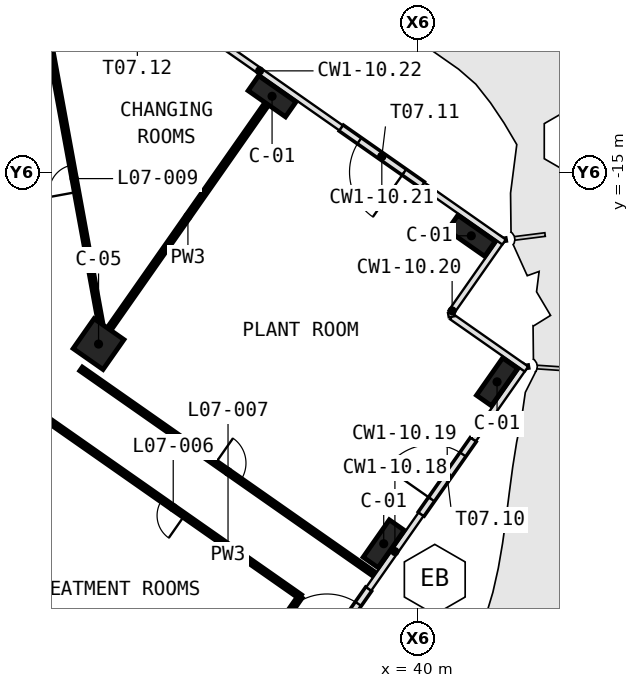
"""IFC4 building model, lengths in metres.
Left out: names, types, materials, properties, quantities, classifications, styles, units other than length and angle.
Written with IfcOpenShell. Run it as: python <this file> out.ifc"""

import sys

from ifc_helpers import new_model, si_unit, direction, frame, frame_2d, origin, origin_2d, place, context, subcontext, project, spatial, rectangle, extrude, element, fill, save


model = new_model("IFC4")
c1 = context("Model", 3, precision=1e-05, world=origin(), true_north=direction((0.0, 1.0)))
c2 = subcontext(c1, "Body", "Model", "MODEL_VIEW")
j1 = project(units=[si_unit("LENGTHUNIT", "METRE"), si_unit("PLANEANGLEUNIT", "RADIAN")], contexts=[c1])
p1 = place(None, origin())
s1 = spatial("IfcSite", under=j1, at=p1, CompositionType="ELEMENT")
p2 = place(p1, origin())
s2 = spatial("IfcBuilding", under=s1, at=p2, CompositionType="ELEMENT")
p3 = place(p2, frame((0.0, 0.0, 48.5)))
s3 = spatial("IfcBuildingStorey", under=s2, at=p3, CompositionType="ELEMENT", Elevation=48.5)
for number, where, z_axis, x_axis in (
    (1, (35.197, -12.498, 0.0), (0.0, 0.0, 1.0), (0.819, -0.574, 0.0)),
    (2, (41.75, -17.087, 0.0), (0.0, 0.0, 1.0), (0.819, -0.574, 0.0)),
    (3, (38.869, -27.216, 0.0), (0.0, 0.0, 1.0), (0.574, 0.819, 0.0)),
    (4, (42.597, -21.892, 0.0), (0.0, 0.0, 1.0), (0.574, 0.819, 0.0)),
):
    element("IfcColumn", number, at=place(p3, frame(where, z_axis=z_axis, x_axis=x_axis)), inside=s3, PredefinedType="COLUMN", context=c2, shape_type="SweptSolid", body=[
        extrude(rectangle(XDim=1.5, YDim=0.6, at=origin_2d()), origin(), (0.0, 0.0, 1.0), 6.0),
    ])
p4 = place(p3, frame((29.49, -20.649, 0.0), z_axis=(0.0, 0.0, 1.0), x_axis=(0.819152044289, -0.573576436351, 0.0)))
e5 = element("IfcColumn", 5, at=p4, inside=s3, PredefinedType="COLUMN", context=c2, shape_type="SweptSolid", body=[
    extrude(rectangle(XDim=1.2, YDim=1.2, at=origin_2d()), origin(), (0.0, 0.0, 1.0), 6.0),
])
p5 = place(p3, frame((36.674, -31.136, 0.0), z_axis=(0.0, 0.0, 1.0), x_axis=(0.57354593704, 0.81917339929, 0.0)))
e6 = element("IfcWall", 6, at=p5, inside=s3, PredefinedType="SOLIDWALL", context=c2, shape_type="SweptSolid", body=[
    extrude(rectangle(XDim=2.94, YDim=0.2, at=frame_2d((1.47, 0.0))), origin(), (0.0, 0.0, 1.0), 5.72),
])
p6 = place(p5, frame((0.57, 0.0, 0.0)))
e7 = element("IfcOpeningElement", 7, at=p6, cuts=e6, PredefinedType="OPENING", context=c2, shape_type="SweptSolid", body=[
    extrude(rectangle(XDim=1.8, YDim=2.4, at=frame_2d((0.9, 1.2))), frame((0.0, 0.11, 0.0), z_axis=(0.0, -1.0, 0.0), x_axis=(1.0, 0.0, 0.0)), (0.0, 0.0, 1.0), 0.22),
])
p7 = place(p3, frame((40.115, -26.221, 0.0), z_axis=(0.0, 0.0, 1.0), x_axis=(0.573584953252, 0.819146080625, 0.0)))
e8 = element("IfcWall", 8, at=p7, inside=s3, PredefinedType="SOLIDWALL", context=c2, shape_type="SweptSolid", body=[
    extrude(rectangle(XDim=2.94, YDim=0.2, at=frame_2d((1.47, 0.0))), origin(), (0.0, 0.0, 1.0), 5.72),
])
p8 = place(p7, frame((0.57, 0.0, 0.0)))
e9 = element("IfcOpeningElement", 9, at=p8, cuts=e8, PredefinedType="OPENING", context=c2, shape_type="SweptSolid", body=[
    extrude(rectangle(XDim=1.8, YDim=2.4, at=frame_2d((0.9, 1.2))), frame((0.0, 0.11, 0.0), z_axis=(0.0, -1.0, 0.0), x_axis=(1.0, 0.0, 0.0)), (0.0, 0.0, 1.0), 0.22),
])
p9 = place(p3, frame((40.122, -15.398, 0.0), z_axis=(0.0, 0.0, 1.0), x_axis=(-0.819156924044, 0.573569467276, 0.0)))
e10 = element("IfcWall", 10, at=p9, inside=s3, PredefinedType="SOLIDWALL", context=c2, shape_type="SweptSolid", body=[
    extrude(rectangle(XDim=3.212, YDim=0.2, at=frame_2d((1.606, 0.0))), origin(), (0.0, 0.0, 1.0), 5.72),
])
p10 = place(p9, frame((0.706, 0.0, 0.0)))
e11 = element("IfcOpeningElement", 11, at=p10, cuts=e10, PredefinedType="OPENING", context=c2, shape_type="SweptSolid", body=[
    extrude(rectangle(XDim=1.8, YDim=2.4, at=frame_2d((0.9, 1.2))), frame((0.0, 0.11, 0.0), z_axis=(0.0, -1.0, 0.0), x_axis=(1.0, 0.0, 0.0)), (0.0, 0.0, 1.0), 0.22),
])
p11 = place(p3, frame((28.914, -21.467, 0.0), z_axis=(0.0, 0.0, 1.0), x_axis=(0.81915027628, -0.573578961322, 0.0)))
e12 = element("IfcWall", 12, at=p11, inside=s3, PredefinedType="PARTITIONING", context=c2, shape_type="SweptSolid", body=[
    extrude(rectangle(XDim=11.802, YDim=0.15, at=frame_2d((5.901, 0.0))), origin(), (0.0, 0.0, 1.0), 4.9),
])
p12 = place(p11, frame((5.401, 0.0, 0.0)))
e13 = element("IfcOpeningElement", 13, at=p12, cuts=e12, PredefinedType="OPENING", context=c2, shape_type="SweptSolid", body=[
    extrude(rectangle(XDim=1.0, YDim=2.1, at=frame_2d((0.5, 1.05))), frame((0.0, 0.085, 0.0), z_axis=(0.0, -1.0, 0.0), x_axis=(1.0, 0.0, 0.0)), (0.0, 0.0, 1.0), 0.17),
])
p13 = place(p3, frame((35.264, -30.185, 0.0), z_axis=(0.0, 0.0, 1.0), x_axis=(0.573527897688, 0.819186029284, 0.0)))
e14 = element("IfcWall", 14, at=p13, inside=s3, PredefinedType="PARTITIONING", context=c2, shape_type="SweptSolid", body=[
    extrude(rectangle(XDim=1.5, YDim=0.15, at=frame_2d((0.75, 0.0))), origin(), (0.0, 0.0, 1.0), 5.72),
])
p14 = place(p3, frame((36.124, -28.957, 0.0), z_axis=(0.0, 0.0, 1.0), x_axis=(-0.819141970204, 0.573590823366, 0.0)))
e15 = element("IfcWall", 15, at=p14, inside=s3, PredefinedType="PARTITIONING", context=c2, shape_type="SweptSolid", body=[
    extrude(rectangle(XDim=10.202, YDim=0.15, at=frame_2d((5.101, 0.0))), origin(), (0.0, 0.0, 1.0), 5.0),
])
p15 = place(p14, frame((4.651, 0.0, 0.0)))
e16 = element("IfcOpeningElement", 16, at=p15, cuts=e15, PredefinedType="OPENING", context=c2, shape_type="SweptSolid", body=[
    extrude(rectangle(XDim=0.9, YDim=2.1, at=frame_2d((0.45, 1.05))), frame((0.0, 0.085, 0.0), z_axis=(0.0, -1.0, 0.0), x_axis=(1.0, 0.0, 0.0)), (0.0, 0.0, 1.0), 0.17),
])
p16 = place(p3, frame((35.013, -12.76, 0.0), z_axis=(0.0, 0.0, 1.0), x_axis=(-0.573558725113, -0.819164445546, 0.0)))
e17 = element("IfcWall", 17, at=p16, inside=s3, PredefinedType="PARTITIONING", context=c2, shape_type="SweptSolid", body=[
    extrude(rectangle(XDim=9.01, YDim=0.15, at=frame_2d((4.505, 0.0))), origin(), (0.0, 0.0, 1.0), 5.0),
])
p17 = place(p3, frame((29.551, -19.935, 0.0), z_axis=(0.0, 0.0, 1.0), x_axis=(-0.179754609775, 0.983711482227, 0.0)))
e18 = element("IfcWall", 18, at=p17, inside=s3, PredefinedType="PARTITIONING", context=c2, shape_type="SweptSolid", body=[
    extrude(rectangle(XDim=9.615, YDim=0.15, at=frame_2d((4.807, 0.0))), origin(), (0.0, 0.0, 1.0), 5.72),
])
p18 = place(p17, frame((4.357, 0.0, 0.0)))
e19 = element("IfcOpeningElement", 19, at=p18, cuts=e18, PredefinedType="OPENING", context=c2, shape_type="SweptSolid", body=[
    extrude(rectangle(XDim=0.9, YDim=2.1, at=frame_2d((0.45, 1.05))), frame((0.0, 0.085, 0.0), z_axis=(0.0, -1.0, 0.0), x_axis=(1.0, 0.0, 0.0)), (0.0, 0.0, 1.0), 0.17),
])
p19 = place(p6, origin())
e20 = element("IfcDoor", 20, at=p19, inside=s3, OperationType="DOUBLE_DOOR_DOUBLE_SWING", PredefinedType="DOOR", context=c2, shape_type="SweptSolid", body=[
    extrude(rectangle(XDim=1.8, YDim=2.4, at=frame_2d((0.9, 1.2))), frame((0.0, 0.025, 0.0), z_axis=(0.0, -1.0, 0.0), x_axis=(1.0, 0.0, 0.0)), (0.0, 0.0, 1.0), 0.05),
])
fill(e7, e20)
p20 = place(p8, origin())
e21 = element("IfcDoor", 21, at=p20, inside=s3, OperationType="DOUBLE_DOOR_DOUBLE_SWING", PredefinedType="DOOR", context=c2, shape_type="SweptSolid", body=[
    extrude(rectangle(XDim=1.8, YDim=2.4, at=frame_2d((0.9, 1.2))), frame((0.0, 0.025, 0.0), z_axis=(0.0, -1.0, 0.0), x_axis=(1.0, 0.0, 0.0)), (0.0, 0.0, 1.0), 0.05),
])
fill(e9, e21)
p21 = place(p10, origin())
e22 = element("IfcDoor", 22, at=p21, inside=s3, OperationType="DOUBLE_DOOR_DOUBLE_SWING", PredefinedType="DOOR", context=c2, shape_type="SweptSolid", body=[
    extrude(rectangle(XDim=1.8, YDim=2.4, at=frame_2d((0.9, 1.2))), frame((0.0, 0.025, 0.0), z_axis=(0.0, -1.0, 0.0), x_axis=(1.0, 0.0, 0.0)), (0.0, 0.0, 1.0), 0.05),
])
fill(e11, e22)
p22 = place(p15, origin())
e23 = element("IfcDoor", 23, at=p22, inside=s3, OperationType="SINGLE_SWING_LEFT", PredefinedType="DOOR", context=c2, shape_type="SweptSolid", body=[
    extrude(rectangle(XDim=0.9, YDim=2.1, at=frame_2d((0.45, 1.05))), frame((0.0, 0.025, 0.0), z_axis=(0.0, -1.0, 0.0), x_axis=(1.0, 0.0, 0.0)), (0.0, 0.0, 1.0), 0.05),
])
fill(e16, e23)
p23 = place(p12, origin())
e24 = element("IfcDoor", 24, at=p23, inside=s3, OperationType="SINGLE_SWING_RIGHT", PredefinedType="DOOR", context=c2, shape_type="SweptSolid", body=[
    extrude(rectangle(XDim=1.0, YDim=2.1, at=frame_2d((0.5, 1.05))), frame((0.0, 0.025, 0.0), z_axis=(0.0, -1.0, 0.0), x_axis=(1.0, 0.0, 0.0)), (0.0, 0.0, 1.0), 0.05),
])
fill(e13, e24)
p24 = place(p18, origin())
e25 = element("IfcDoor", 25, at=p24, inside=s3, OperationType="SINGLE_SWING_LEFT", PredefinedType="DOOR", context=c2, shape_type="SweptSolid", body=[
    extrude(rectangle(XDim=0.9, YDim=2.1, at=frame_2d((0.45, 1.05))), frame((0.0, 0.025, 0.0), z_axis=(0.0, -1.0, 0.0), x_axis=(1.0, 0.0, 0.0)), (0.0, 0.0, 1.0), 0.05),
])
fill(e19, e25)
save(model, sys.argv[1])
